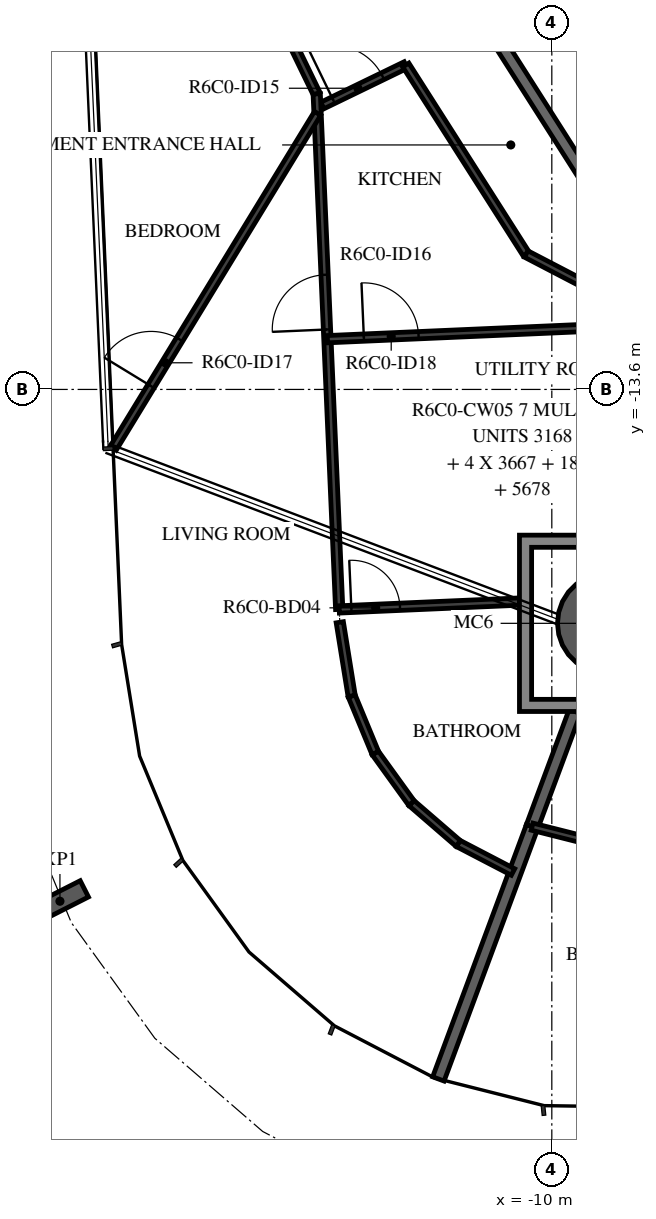
"""IFC4 building model, lengths in metres.
Left out: names, types, materials, properties, quantities, classifications, styles, units other than length and angle.
Written with IfcOpenShell. Run it as: python <this file> out.ifc"""

import sys

from ifc_helpers import new_model, si_unit, direction, frame, frame_2d, origin, origin_2d, place, context, subcontext, project, spatial, polyline, rectangle, hollow_circle, i_section, outline, extrude, element, fill, save


model = new_model("IFC4")
c1 = context("Model", 3, precision=1e-05, world=origin(), true_north=direction((0.0, 1.0)))
c2 = subcontext(c1, "Body", "Model", "MODEL_VIEW")
j1 = project(units=[si_unit("LENGTHUNIT", "METRE"), si_unit("PLANEANGLEUNIT", "RADIAN")], contexts=[c1])
p1 = place(None, origin())
s1 = spatial("IfcSite", under=j1, at=p1, CompositionType="ELEMENT")
p2 = place(p1, origin())
s2 = spatial("IfcBuilding", under=s1, at=p2, CompositionType="ELEMENT")
p3 = place(p2, frame((0.0, 0.0, 254.7)))
s3 = spatial("IfcBuildingStorey", under=s2, at=p3, CompositionType="ELEMENT", Elevation=254.7)
p4 = place(p3, frame((-9.082, -17.446, -0.38), z_axis=(0.0, 0.0, 1.0), x_axis=(1.0, 0.0, 0.0)))
e1 = element("IfcColumn", 1, at=p4, inside=s3, PredefinedType="COLUMN", context=c2, shape_type="SweptSolid", body=[
    extrude(hollow_circle(Radius=0.825, WallThickness=0.04, at=origin_2d()), origin(), (0.0, 0.0, 1.0), 2.616),
])
p5 = place(p3, frame((-18.089, -22.016, -0.38), z_axis=(0.0, 0.0, 1.0), x_axis=(-0.452473836659, 0.89177767809, 0.0)))
e2 = element("IfcColumn", 2, at=p5, inside=s3, PredefinedType="COLUMN", context=c2, shape_type="SweptSolid", body=[
    extrude(i_section(OverallWidth=0.3, OverallDepth=0.9, WebThickness=0.019, FlangeThickness=0.035, FilletRadius=0.03, at=origin_2d()), origin(), (0.0, 0.0, 1.0), 2.616),
])
p6 = place(p3, frame((-11.565, -6.786, 0.0), z_axis=(0.0, 0.0, 1.0), x_axis=(0.537297327359, -0.843392898958, 0.0)))
e3 = element("IfcWall", 3, at=p6, inside=s3, PredefinedType="STANDARD", context=c2, shape_type="SweptSolid", body=[
    extrude(rectangle(XDim=4.081, YDim=0.2, at=frame_2d((2.041, 0.0))), origin(), (0.0, 0.0, 1.0), 3.05),
])
p7 = place(p3, frame((-11.865, -24.939, 0.0), z_axis=(0.0, 0.0, 1.0), x_axis=(0.348214227297, 0.937414983829, 0.0)))
e4 = element("IfcWall", 4, at=p7, inside=s3, PredefinedType="STANDARD", context=c2, shape_type="SweptSolid", body=[
    extrude(rectangle(XDim=4.426, YDim=0.2, at=frame_2d((2.213, 0.0))), origin(), (0.0, 0.0, 1.0), 3.05),
])
p8 = place(p3, frame((-10.324, -20.79, 0.0), z_axis=(0.0, 0.0, 1.0), x_axis=(0.348313973933, 0.937377925686, 0.0)))
e5 = element("IfcWall", 5, at=p8, inside=s3, PredefinedType="STANDARD", context=c2, shape_type="SweptSolid", body=[
    extrude(rectangle(XDim=2.02, YDim=0.2, at=frame_2d((1.01, 0.0))), origin(), (0.0, 0.0, 1.0), 3.05),
])
p9 = place(p3, frame((-14.516, -7.402, 0.0), z_axis=(0.0, 0.0, 1.0), x_axis=(0.436676244377, -0.899618729016, 0.0)))
e6 = element("IfcWall", 6, at=p9, inside=s3, PredefinedType="PARTITIONING", context=c2, shape_type="SweptSolid", body=[
    extrude(rectangle(XDim=1.487, YDim=0.12, at=frame_2d((0.744, 0.0))), origin(), (0.0, 0.0, 1.0), 3.05),
])
p10 = place(p3, frame((-13.773, -8.931, 0.0), z_axis=(0.0, 0.0, 1.0), x_axis=(0.899585443678, 0.436744810527, 0.0)))
e7 = element("IfcWall", 7, at=p10, inside=s3, PredefinedType="PARTITIONING", context=c2, shape_type="SweptSolid", body=[
    extrude(rectangle(XDim=1.525, YDim=0.12, at=frame_2d((0.762, 0.0))), origin(), (0.0, 0.0, 1.0), 3.05),
])
p11 = place(p10, frame((0.2, 0.0, 0.0)))
e8 = element("IfcOpeningElement", 8, at=p11, cuts=e7, PredefinedType="OPENING", context=c2, shape_type="SweptSolid", body=[
    extrude(rectangle(XDim=0.9, YDim=2.1, at=frame_2d((0.45, 1.05))), frame((0.0, 0.07, 0.0), z_axis=(0.0, -1.0, 0.0), x_axis=(1.0, 0.0, 0.0)), (0.0, 0.0, 1.0), 0.14),
])
p12 = place(p3, frame((-12.402, -8.265, 0.0), z_axis=(0.0, 0.0, 1.0), x_axis=(0.537321213777, -0.843377681247, 0.0)))
e9 = element("IfcWall", 9, at=p12, inside=s3, PredefinedType="PARTITIONING", context=c2, shape_type="SweptSolid", body=[
    extrude(rectangle(XDim=3.685, YDim=0.12, at=frame_2d((1.843, 0.0))), origin(), (0.0, 0.0, 1.0), 3.05),
])
p13 = place(p3, frame((-10.421, -11.373, 0.0), z_axis=(0.0, 0.0, 1.0), x_axis=(0.887012970857, -0.461744506769, 0.0)))
e10 = element("IfcWall", 10, at=p13, inside=s3, PredefinedType="PARTITIONING", context=c2, shape_type="SweptSolid", body=[
    extrude(rectangle(XDim=7.985, YDim=0.12, at=frame_2d((3.992, 0.0))), origin(), (0.0, 0.0, 1.0), 3.05),
])
p14 = place(p13, frame((4.192, 0.0, 0.0)))
e11 = element("IfcOpeningElement", 11, at=p14, cuts=e10, PredefinedType="OPENING", context=c2, shape_type="SweptSolid", body=[
    extrude(rectangle(XDim=0.9, YDim=2.1, at=frame_2d((0.45, 1.05))), frame((0.0, 0.07, 0.0), z_axis=(0.0, -1.0, 0.0), x_axis=(1.0, 0.0, 0.0)), (0.0, 0.0, 1.0), 0.14),
])
p15 = place(p3, frame((-13.496, -17.218, 0.0), z_axis=(0.0, 0.0, 1.0), x_axis=(-0.043640714674, 0.999047290183, 0.0)))
e12 = element("IfcWall", 12, at=p15, inside=s3, PredefinedType="PARTITIONING", context=c2, shape_type="SweptSolid", body=[
    extrude(rectangle(XDim=8.487, YDim=0.12, at=frame_2d((4.243, 0.0))), origin(), (0.0, 0.0, 1.0), 3.05),
])
p16 = place(p15, frame((4.608, 0.0, 0.0)))
e13 = element("IfcOpeningElement", 13, at=p16, cuts=e12, PredefinedType="OPENING", context=c2, shape_type="SweptSolid", body=[
    extrude(rectangle(XDim=0.9, YDim=2.1, at=frame_2d((0.45, 1.05))), frame((0.0, 0.07, 0.0), z_axis=(0.0, -1.0, 0.0), x_axis=(1.0, 0.0, 0.0)), (0.0, 0.0, 1.0), 0.14),
])
p17 = place(p3, frame((-17.215, -14.57, 0.0), z_axis=(0.0, 0.0, 1.0), x_axis=(0.520949659667, 0.853587401555, 0.0)))
e14 = element("IfcWall", 14, at=p17, inside=s3, PredefinedType="PARTITIONING", context=c2, shape_type="SweptSolid", body=[
    extrude(rectangle(XDim=6.455, YDim=0.12, at=frame_2d((3.228, 0.0))), origin(), (0.0, 0.0, 1.0), 3.05),
])
p18 = place(p17, frame((1.2, 0.0, 0.0)))
e15 = element("IfcOpeningElement", 15, at=p18, cuts=e14, PredefinedType="OPENING", context=c2, shape_type="SweptSolid", body=[
    extrude(rectangle(XDim=0.9, YDim=2.1, at=frame_2d((0.45, 1.05))), frame((0.0, 0.07, 0.0), z_axis=(0.0, -1.0, 0.0), x_axis=(1.0, 0.0, 0.0)), (0.0, 0.0, 1.0), 0.14),
])
p19 = place(p3, frame((-13.69, -12.774, 0.0), z_axis=(0.0, 0.0, 1.0), x_axis=(0.999048778431, 0.043606631553, 0.0)))
e16 = element("IfcWall", 16, at=p19, inside=s3, PredefinedType="PARTITIONING", context=c2, shape_type="SweptSolid", body=[
    extrude(rectangle(XDim=5.503, YDim=0.12, at=frame_2d((2.752, 0.0))), origin(), (0.0, 0.0, 1.0), 3.05),
])
p20 = place(p19, frame((0.6, 0.0, 0.0)))
e17 = element("IfcOpeningElement", 17, at=p20, cuts=e16, PredefinedType="OPENING", context=c2, shape_type="SweptSolid", body=[
    extrude(rectangle(XDim=0.9, YDim=2.1, at=frame_2d((0.45, 1.05))), frame((0.0, 0.07, 0.0), z_axis=(0.0, -1.0, 0.0), x_axis=(1.0, 0.0, 0.0)), (0.0, 0.0, 1.0), 0.14),
])
for number, where, z_axis, x_axis in (
    (18, (-10.638, -21.536, 0.0), (0.0, 0.0, 1.0), (-0.887, 0.462, 0.0)),
    (19, (-11.539, -21.067, 0.0), (0.0, 0.0, 1.0), (-0.757, 0.654, 0.0)),
    (20, (-12.308, -20.402, 0.0), (0.0, 0.0, 1.0), (-0.585, 0.811, 0.0)),
):
    element("IfcWall", number, at=place(p3, frame(where, z_axis=z_axis, x_axis=x_axis)), inside=s3, PredefinedType="PARTITIONING", context=c2, shape_type="SweptSolid", body=[
        extrude(rectangle(XDim=1.016, YDim=0.12, at=frame_2d((0.508, 0.0))), origin(), (0.0, 0.0, 1.0), 3.05),
    ])
p21 = place(p3, frame((-12.903, -19.579, 0.0), z_axis=(0.0, 0.0, 1.0), x_axis=(-0.382754975976, 0.923849894932, 0.0)))
e21 = element("IfcWall", 21, at=p21, inside=s3, PredefinedType="PARTITIONING", context=c2, shape_type="SweptSolid", body=[
    extrude(rectangle(XDim=1.016, YDim=0.12, at=frame_2d((0.508, 0.0))), origin(), (0.0, 0.0, 1.0), 3.05),
])
p22 = place(p3, frame((-13.292, -18.64, 0.0), z_axis=(0.0, 0.0, 1.0), x_axis=(-0.159363796836, 0.98721992497, 0.0)))
e22 = element("IfcWall", 22, at=p22, inside=s3, PredefinedType="PARTITIONING", context=c2, shape_type="SweptSolid", body=[
    extrude(rectangle(XDim=1.227, YDim=0.12, at=frame_2d((0.614, 0.0))), origin(), (0.0, 0.0, 1.0), 3.05),
])
p23 = place(p3, frame((-13.496, -17.218, 0.0), z_axis=(0.0, 0.0, 1.0), x_axis=(0.999044946677, 0.043694330507, 0.0)))
e23 = element("IfcWall", 23, at=p23, inside=s3, PredefinedType="PARTITIONING", context=c2, shape_type="SweptSolid", body=[
    extrude(rectangle(XDim=2.967, YDim=0.12, at=frame_2d((1.483, 0.0))), origin(), (0.0, 0.0, 1.0), 3.05),
])
p24 = place(p23, frame((0.2, 0.0, 0.0)))
e24 = element("IfcOpeningElement", 24, at=p24, cuts=e23, PredefinedType="OPENING", context=c2, shape_type="SweptSolid", body=[
    extrude(rectangle(XDim=0.8, YDim=2.1, at=frame_2d((0.4, 1.05))), frame((0.0, 0.07, 0.0), z_axis=(0.0, -1.0, 0.0), x_axis=(1.0, 0.0, 0.0)), (0.0, 0.0, 1.0), 0.14),
])
p25 = place(p3, frame((-10.324, -20.79, 0.0), z_axis=(0.0, 0.0, 1.0), x_axis=(0.969547579982, -0.244903021933, 0.0)))
e25 = element("IfcWall", 25, at=p25, inside=s3, PredefinedType="PARTITIONING", context=c2, shape_type="SweptSolid", body=[
    extrude(rectangle(XDim=0.801, YDim=0.12, at=frame_2d((0.4, 0.0))), origin(), (0.0, 0.0, 1.0), 3.05),
])
p26 = place(p3, origin())
e26 = element("IfcWall", 26, at=p26, inside=s3, PredefinedType="STANDARD", context=c2, shape_type="SweptSolid", body=[
    extrude(outline(polyline([(-7.632, -15.996), (-7.632, -18.896), (-10.532, -18.896), (-10.532, -15.996), (-7.632, -15.996)]), holes=[polyline([(-10.332, -18.696), (-7.832, -18.696), (-7.832, -16.196), (-10.332, -16.196), (-10.332, -18.696)])]), origin(), (0.0, 0.0, 1.0), 3.05),
])
p27 = place(p11, origin())
e27 = element("IfcDoor", 27, at=p27, inside=s3, OperationType="SINGLE_SWING_LEFT", PredefinedType="DOOR", context=c2, shape_type="SweptSolid", body=[
    extrude(rectangle(XDim=0.9, YDim=2.1, at=frame_2d((0.45, 1.05))), frame((0.0, 0.025, 0.0), z_axis=(0.0, -1.0, 0.0), x_axis=(1.0, 0.0, 0.0)), (0.0, 0.0, 1.0), 0.05),
])
fill(e8, e27)
p28 = place(p16, origin())
e28 = element("IfcDoor", 28, at=p28, inside=s3, OperationType="SINGLE_SWING_RIGHT", PredefinedType="DOOR", context=c2, shape_type="SweptSolid", body=[
    extrude(rectangle(XDim=0.9, YDim=2.1, at=frame_2d((0.45, 1.05))), frame((0.0, 0.025, 0.0), z_axis=(0.0, -1.0, 0.0), x_axis=(1.0, 0.0, 0.0)), (0.0, 0.0, 1.0), 0.05),
])
fill(e13, e28)
p29 = place(p18, origin())
e29 = element("IfcDoor", 29, at=p29, inside=s3, OperationType="SINGLE_SWING_LEFT", PredefinedType="DOOR", context=c2, shape_type="SweptSolid", body=[
    extrude(rectangle(XDim=0.9, YDim=2.1, at=frame_2d((0.45, 1.05))), frame((0.0, 0.025, 0.0), z_axis=(0.0, -1.0, 0.0), x_axis=(1.0, 0.0, 0.0)), (0.0, 0.0, 1.0), 0.05),
])
fill(e15, e29)
p30 = place(p20, origin())
e30 = element("IfcDoor", 30, at=p30, inside=s3, OperationType="SINGLE_SWING_RIGHT", PredefinedType="DOOR", context=c2, shape_type="SweptSolid", body=[
    extrude(rectangle(XDim=0.9, YDim=2.1, at=frame_2d((0.45, 1.05))), frame((0.0, 0.025, 0.0), z_axis=(0.0, -1.0, 0.0), x_axis=(1.0, 0.0, 0.0)), (0.0, 0.0, 1.0), 0.05),
])
fill(e17, e30)
p31 = place(p24, origin())
e31 = element("IfcDoor", 31, at=p31, inside=s3, OperationType="SINGLE_SWING_RIGHT", PredefinedType="DOOR", context=c2, shape_type="SweptSolid", body=[
    extrude(rectangle(XDim=0.8, YDim=2.1, at=frame_2d((0.4, 1.05))), frame((0.0, 0.025, 0.0), z_axis=(0.0, -1.0, 0.0), x_axis=(1.0, 0.0, 0.0)), (0.0, 0.0, 1.0), 0.05),
])
fill(e24, e31)
save(model, sys.argv[1])
